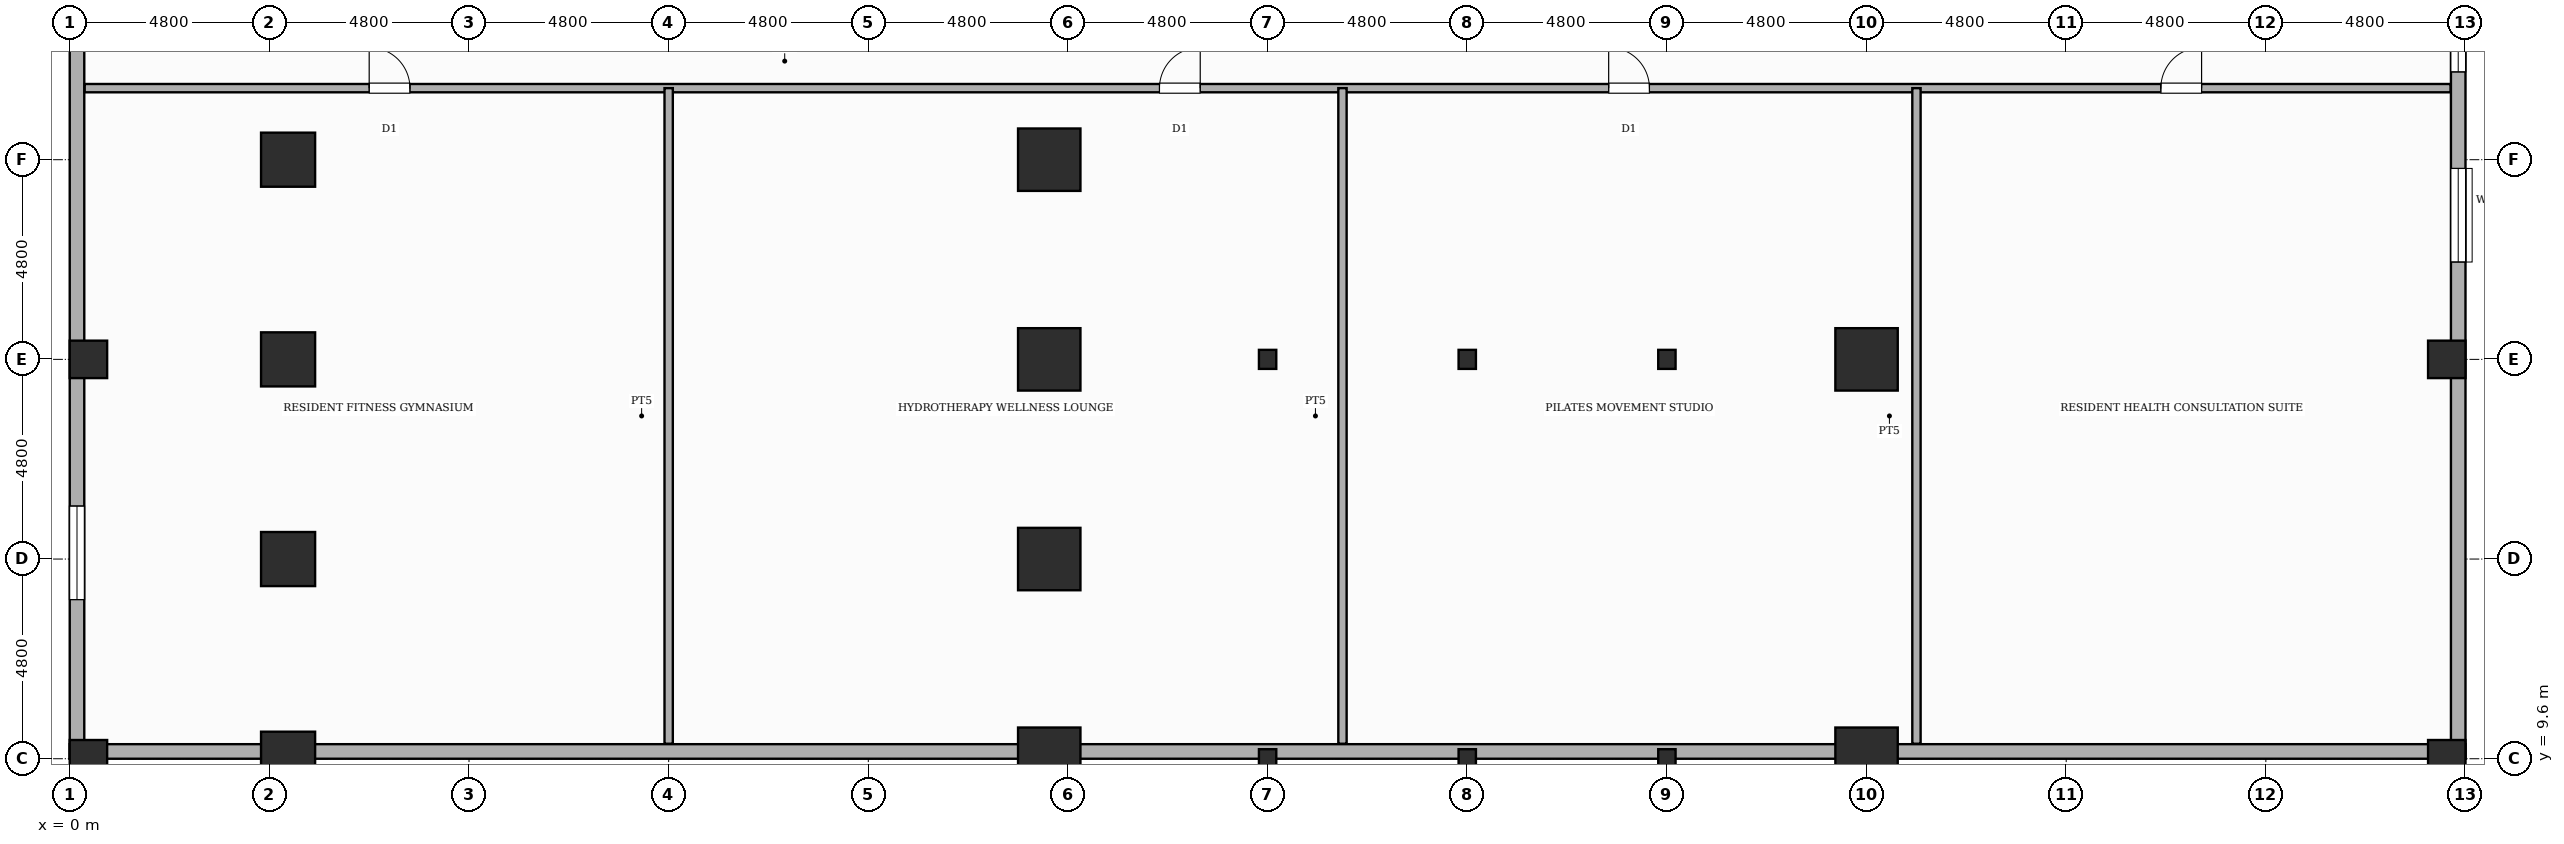
"""IFC4 building model, lengths in metres.
Left out: names, types, materials, properties, quantities, classifications, styles, units other than length and angle.
Written with IfcOpenShell. Run it as: python <this file> out.ifc"""

import sys

from ifc_helpers import new_model, si_unit, direction, frame, frame_2d, origin, origin_2d, place, context, subcontext, project, spatial, rectangle, circle, i_section, extrude, element, fill, save


model = new_model("IFC4")
c1 = context("Model", 3, precision=1e-05, world=origin(), true_north=direction((0.0, 1.0)))
c2 = subcontext(c1, "Body", "Model", "MODEL_VIEW")
j1 = project(units=[si_unit("LENGTHUNIT", "METRE"), si_unit("PLANEANGLEUNIT", "RADIAN")], contexts=[c1])
p1 = place(None, origin())
s1 = spatial("IfcSite", under=j1, at=p1, CompositionType="ELEMENT")
p2 = place(p1, origin())
s2 = spatial("IfcBuilding", under=s1, at=p2, CompositionType="ELEMENT")
p3 = place(p2, frame((0.0, 0.0, 19.6)))
s3 = spatial("IfcBuildingStorey", under=s2, at=p3, CompositionType="ELEMENT", Elevation=19.6)
for number, where, z_axis, x_axis in (
    (1, (0.45, 9.6, 0.0), (0.0, 0.0, 1.0), (1.0, 0.0, 0.0)),
    (2, (0.45, 19.2, 0.0), (0.0, 0.0, 1.0), (1.0, 0.0, 0.0)),
):
    element("IfcColumn", number, at=place(p3, frame(where, z_axis=z_axis, x_axis=x_axis)), inside=s3, PredefinedType="COLUMN", context=c2, shape_type="SweptSolid", body=[
        extrude(circle(Radius=0.45, at=origin_2d()), origin(), (0.0, 0.0, 1.0), 5.4),
    ])
for number, where, z_axis, x_axis in (
    (3, (5.25, 9.6, 0.0), (0.0, 0.0, 1.0), (1.0, 0.0, 0.0)),
    (4, (5.25, 14.4, 0.0), (0.0, 0.0, 1.0), (1.0, 0.0, 0.0)),
    (5, (5.25, 19.2, 0.0), (0.0, 0.0, 1.0), (1.0, 0.0, 0.0)),
    (6, (5.25, 24.0, 0.0), (0.0, 0.0, 1.0), (1.0, 0.0, 0.0)),
):
    element("IfcColumn", number, at=place(p3, frame(where, z_axis=z_axis, x_axis=x_axis)), inside=s3, PredefinedType="COLUMN", context=c2, shape_type="SweptSolid", body=[
        extrude(rectangle(XDim=1.3, YDim=1.3, at=origin_2d()), origin(), (0.0, 0.0, 1.0), 5.4),
    ])
for number, where, z_axis, x_axis in (
    (7, (23.55, 9.6, 0.0), (0.0, 0.0, 1.0), (1.0, 0.0, 0.0)),
    (8, (23.55, 14.4, 0.0), (0.0, 0.0, 1.0), (1.0, 0.0, 0.0)),
    (9, (23.55, 19.2, 0.0), (0.0, 0.0, 1.0), (1.0, 0.0, 0.0)),
    (10, (23.55, 24.0, 0.0), (0.0, 0.0, 1.0), (1.0, 0.0, 0.0)),
):
    element("IfcColumn", number, at=place(p3, frame(where, z_axis=z_axis, x_axis=x_axis)), inside=s3, PredefinedType="USERDEFINED", context=c2, shape_type="SweptSolid", body=[
        extrude(rectangle(XDim=1.5, YDim=1.5, at=origin_2d()), origin(), (0.0, 0.0, 1.0), 5.4),
    ])
for number, where, z_axis, x_axis in (
    (11, (28.8, 9.6, 0.0), (0.0, 0.0, 1.0), (1.0, 0.0, 0.0)),
    (12, (28.8, 19.2, 0.0), (0.0, 0.0, 1.0), (1.0, 0.0, 0.0)),
    (13, (33.6, 9.6, 0.0), (0.0, 0.0, 1.0), (1.0, 0.0, 0.0)),
    (14, (33.6, 19.2, 0.0), (0.0, 0.0, 1.0), (1.0, 0.0, 0.0)),
    (15, (38.4, 9.6, 0.0), (0.0, 0.0, 1.0), (1.0, 0.0, 0.0)),
    (16, (38.4, 19.2, 0.0), (0.0, 0.0, 1.0), (1.0, 0.0, 0.0)),
):
    element("IfcColumn", number, at=place(p3, frame(where, z_axis=z_axis, x_axis=x_axis)), inside=s3, PredefinedType="COLUMN", context=c2, shape_type="SweptSolid", body=[
        extrude(i_section(OverallWidth=0.417, OverallDepth=0.458, WebThickness=0.03, FlangeThickness=0.045, FilletRadius=0.022, at=origin_2d()), origin(), (0.0, 0.0, 1.0), 5.4),
    ])
for number, where, z_axis, x_axis in (
    (17, (43.2, 9.6, 0.0), (0.0, 0.0, 1.0), (1.0, 0.0, 0.0)),
    (18, (43.2, 19.2, 0.0), (0.0, 0.0, 1.0), (1.0, 0.0, 0.0)),
):
    element("IfcColumn", number, at=place(p3, frame(where, z_axis=z_axis, x_axis=x_axis)), inside=s3, PredefinedType="USERDEFINED", context=c2, shape_type="SweptSolid", body=[
        extrude(rectangle(XDim=1.5, YDim=1.5, at=origin_2d()), origin(), (0.0, 0.0, 1.0), 5.4),
    ])
for number, where, z_axis, x_axis in (
    (19, (57.15, 9.6, 0.0), (0.0, 0.0, 1.0), (1.0, 0.0, 0.0)),
    (20, (57.15, 19.2, 0.0), (0.0, 0.0, 1.0), (1.0, 0.0, 0.0)),
):
    element("IfcColumn", number, at=place(p3, frame(where, z_axis=z_axis, x_axis=x_axis)), inside=s3, PredefinedType="COLUMN", context=c2, shape_type="SweptSolid", body=[
        extrude(circle(Radius=0.45, at=origin_2d()), origin(), (0.0, 0.0, 1.0), 5.4),
    ])
p4 = place(p3, frame((57.425, 48.0, 0.0), z_axis=(0.0, 0.0, 1.0), x_axis=(0.0, -1.0, 0.0)))
e21 = element("IfcWall", 21, at=p4, inside=s3, PredefinedType="STANDARD", context=c2, shape_type="SweptSolid", body=[
    extrude(rectangle(XDim=38.4, YDim=0.35, at=frame_2d((19.2, 0.0))), origin(), (0.0, 0.0, 1.0), 4.23),
])
p5 = place(p4, frame((20.39, 0.0, 0.85)))
e22 = element("IfcOpeningElement", 22, at=p5, cuts=e21, PredefinedType="OPENING", context=c2, shape_type="SweptSolid", body=[
    extrude(rectangle(XDim=1.5, YDim=2.1, at=frame_2d((0.75, 1.05))), frame((0.0, 0.185, 0.0), z_axis=(0.0, -1.0, 0.0), x_axis=(1.0, 0.0, 0.0)), (0.0, 0.0, 1.0), 0.37),
])
p6 = place(p4, frame((1.625, 0.0, 0.85)))
e23 = element("IfcOpeningElement", 23, at=p6, cuts=e21, PredefinedType="OPENING", context=c2, shape_type="SweptSolid", body=[
    extrude(rectangle(XDim=2.25, YDim=2.85, at=frame_2d((1.125, 1.425))), frame((0.0, 0.185, 0.0), z_axis=(0.0, -1.0, 0.0), x_axis=(1.0, 0.0, 0.0)), (0.0, 0.0, 1.0), 0.37),
])
p7 = place(p4, frame((24.21, 0.0, 0.85)))
e24 = element("IfcOpeningElement", 24, at=p7, cuts=e21, PredefinedType="OPENING", context=c2, shape_type="SweptSolid", body=[
    extrude(rectangle(XDim=2.25, YDim=2.85, at=frame_2d((1.125, 1.425))), frame((0.0, 0.185, 0.0), z_axis=(0.0, -1.0, 0.0), x_axis=(1.0, 0.0, 0.0)), (0.0, 0.0, 1.0), 0.37),
])
p8 = place(p3, frame((57.6, 9.775, 0.0), z_axis=(0.0, 0.0, 1.0), x_axis=(-1.0, 0.0, 0.0)))
e25 = element("IfcWall", 25, at=p8, inside=s3, PredefinedType="STANDARD", context=c2, shape_type="SweptSolid", body=[
    extrude(rectangle(XDim=57.6, YDim=0.35, at=frame_2d((28.8, 0.0))), origin(), (0.0, 0.0, 1.0), 4.23),
])
p9 = place(p3, frame((0.175, 9.6, 0.0), z_axis=(0.0, 0.0, 1.0), x_axis=(0.0, 1.0, 0.0)))
e26 = element("IfcWall", 26, at=p9, inside=s3, PredefinedType="STANDARD", context=c2, shape_type="SweptSolid", body=[
    extrude(rectangle(XDim=38.4, YDim=0.35, at=frame_2d((19.2, 0.0))), origin(), (0.0, 0.0, 1.0), 4.23),
])
p10 = place(p9, frame((3.825, 0.0, 0.85)))
e27 = element("IfcOpeningElement", 27, at=p10, cuts=e26, PredefinedType="OPENING", context=c2, shape_type="SweptSolid", body=[
    extrude(rectangle(XDim=2.25, YDim=2.85, at=frame_2d((1.125, 1.425))), frame((0.0, 0.185, 0.0), z_axis=(0.0, -1.0, 0.0), x_axis=(1.0, 0.0, 0.0)), (0.0, 0.0, 1.0), 0.37),
])
p11 = place(p3, frame((0.36, 25.72, 0.0), z_axis=(0.0, 0.0, 1.0), x_axis=(1.0, 0.0, 0.0)))
e28 = element("IfcWall", 28, at=p11, inside=s3, PredefinedType="PARTITIONING", context=c2, shape_type="SweptSolid", body=[
    extrude(rectangle(XDim=56.88, YDim=0.2, at=frame_2d((28.44, 0.0))), origin(), (0.0, 0.0, 1.0), 5.15),
])
p12 = place(p11, frame((6.84, 0.0, 0.0)))
e29 = element("IfcOpeningElement", 29, at=p12, cuts=e28, PredefinedType="OPENING", context=c2, shape_type="SweptSolid", body=[
    extrude(rectangle(XDim=0.98, YDim=2.18, at=frame_2d((0.49, 1.09))), frame((0.0, 0.11, 0.0), z_axis=(0.0, -1.0, 0.0), x_axis=(1.0, 0.0, 0.0)), (0.0, 0.0, 1.0), 0.22),
])
p13 = place(p11, frame((25.84, 0.0, 0.0)))
e30 = element("IfcOpeningElement", 30, at=p13, cuts=e28, PredefinedType="OPENING", context=c2, shape_type="SweptSolid", body=[
    extrude(rectangle(XDim=0.98, YDim=2.18, at=frame_2d((0.49, 1.09))), frame((0.0, 0.11, 0.0), z_axis=(0.0, -1.0, 0.0), x_axis=(1.0, 0.0, 0.0)), (0.0, 0.0, 1.0), 0.22),
])
p14 = place(p11, frame((36.64, 0.0, 0.0)))
e31 = element("IfcOpeningElement", 31, at=p14, cuts=e28, PredefinedType="OPENING", context=c2, shape_type="SweptSolid", body=[
    extrude(rectangle(XDim=0.98, YDim=2.18, at=frame_2d((0.49, 1.09))), frame((0.0, 0.11, 0.0), z_axis=(0.0, -1.0, 0.0), x_axis=(1.0, 0.0, 0.0)), (0.0, 0.0, 1.0), 0.22),
])
p15 = place(p11, frame((49.915, 0.0, 0.0)))
e32 = element("IfcOpeningElement", 32, at=p15, cuts=e28, PredefinedType="OPENING", context=c2, shape_type="SweptSolid", body=[
    extrude(rectangle(XDim=0.98, YDim=2.18, at=frame_2d((0.49, 1.09))), frame((0.0, 0.11, 0.0), z_axis=(0.0, -1.0, 0.0), x_axis=(1.0, 0.0, 0.0)), (0.0, 0.0, 1.0), 0.22),
])
p16 = place(p3, frame((14.4, 9.96, 0.0), z_axis=(0.0, 0.0, 1.0), x_axis=(0.0, 1.0, 0.0)))
e33 = element("IfcWall", 33, at=p16, inside=s3, PredefinedType="SOLIDWALL", context=c2, shape_type="SweptSolid", body=[
    extrude(rectangle(XDim=15.76, YDim=0.2, at=frame_2d((7.88, 0.0))), origin(), (0.0, 0.0, 1.0), 3.78),
])
for number, where, z_axis, x_axis in (
    (34, (30.6, 9.96, 0.0), (0.0, 0.0, 1.0), (0.0, 1.0, 0.0)),
    (35, (44.4, 9.96, 0.0), (0.0, 0.0, 1.0), (0.0, 1.0, 0.0)),
):
    element("IfcWall", number, at=place(p3, frame(where, z_axis=z_axis, x_axis=x_axis)), inside=s3, PredefinedType="SOLIDWALL", context=c2, shape_type="SweptSolid", body=[
        extrude(rectangle(XDim=15.76, YDim=0.2, at=frame_2d((7.88, 0.0))), origin(), (0.0, 0.0, 1.0), 5.15),
    ])
p17 = place(p5, origin())
e36 = element("IfcWindow", 36, at=p17, inside=s3, PartitioningType="SINGLE_PANEL", PredefinedType="WINDOW", context=c2, shape_type="SweptSolid", body=[
    extrude(rectangle(XDim=1.5, YDim=2.1, at=frame_2d((0.75, 1.05))), frame((0.0, 0.03, 0.0), z_axis=(0.0, -1.0, 0.0), x_axis=(1.0, 0.0, 0.0)), (0.0, 0.0, 1.0), 0.06),
])
fill(e22, e36)
p18 = place(p7, origin())
e37 = element("IfcWindow", 37, at=p18, inside=s3, PartitioningType="SINGLE_PANEL", PredefinedType="WINDOW", context=c2, shape_type="SweptSolid", body=[
    extrude(rectangle(XDim=2.25, YDim=2.85, at=frame_2d((1.125, 1.425))), frame((0.0, 0.03, 0.0), z_axis=(0.0, -1.0, 0.0), x_axis=(1.0, 0.0, 0.0)), (0.0, 0.0, 1.0), 0.06),
])
fill(e24, e37)
p19 = place(p10, origin())
e38 = element("IfcWindow", 38, at=p19, inside=s3, PartitioningType="SINGLE_PANEL", PredefinedType="WINDOW", context=c2, shape_type="SweptSolid", body=[
    extrude(rectangle(XDim=2.25, YDim=2.85, at=frame_2d((1.125, 1.425))), frame((0.0, 0.03, 0.0), z_axis=(0.0, -1.0, 0.0), x_axis=(1.0, 0.0, 0.0)), (0.0, 0.0, 1.0), 0.06),
])
fill(e27, e38)
p20 = place(p12, origin())
e39 = element("IfcDoor", 39, at=p20, inside=s3, OperationType="SINGLE_SWING_LEFT", PredefinedType="DOOR", context=c2, shape_type="SweptSolid", body=[
    extrude(rectangle(XDim=0.98, YDim=2.18, at=frame_2d((0.49, 1.09))), frame((0.0, 0.025, 0.0), z_axis=(0.0, -1.0, 0.0), x_axis=(1.0, 0.0, 0.0)), (0.0, 0.0, 1.0), 0.05),
])
fill(e29, e39)
p21 = place(p13, origin())
e40 = element("IfcDoor", 40, at=p21, inside=s3, OperationType="SINGLE_SWING_RIGHT", PredefinedType="DOOR", context=c2, shape_type="SweptSolid", body=[
    extrude(rectangle(XDim=0.98, YDim=2.18, at=frame_2d((0.49, 1.09))), frame((0.0, 0.025, 0.0), z_axis=(0.0, -1.0, 0.0), x_axis=(1.0, 0.0, 0.0)), (0.0, 0.0, 1.0), 0.05),
])
fill(e30, e40)
p22 = place(p14, origin())
e41 = element("IfcDoor", 41, at=p22, inside=s3, OperationType="SINGLE_SWING_LEFT", PredefinedType="DOOR", context=c2, shape_type="SweptSolid", body=[
    extrude(rectangle(XDim=0.98, YDim=2.18, at=frame_2d((0.49, 1.09))), frame((0.0, 0.025, 0.0), z_axis=(0.0, -1.0, 0.0), x_axis=(1.0, 0.0, 0.0)), (0.0, 0.0, 1.0), 0.05),
])
fill(e31, e41)
p23 = place(p15, origin())
e42 = element("IfcDoor", 42, at=p23, inside=s3, OperationType="SINGLE_SWING_RIGHT", PredefinedType="DOOR", context=c2, shape_type="SweptSolid", body=[
    extrude(rectangle(XDim=0.98, YDim=2.18, at=frame_2d((0.49, 1.09))), frame((0.0, 0.025, 0.0), z_axis=(0.0, -1.0, 0.0), x_axis=(1.0, 0.0, 0.0)), (0.0, 0.0, 1.0), 0.05),
])
fill(e32, e42)
save(model, sys.argv[1])
